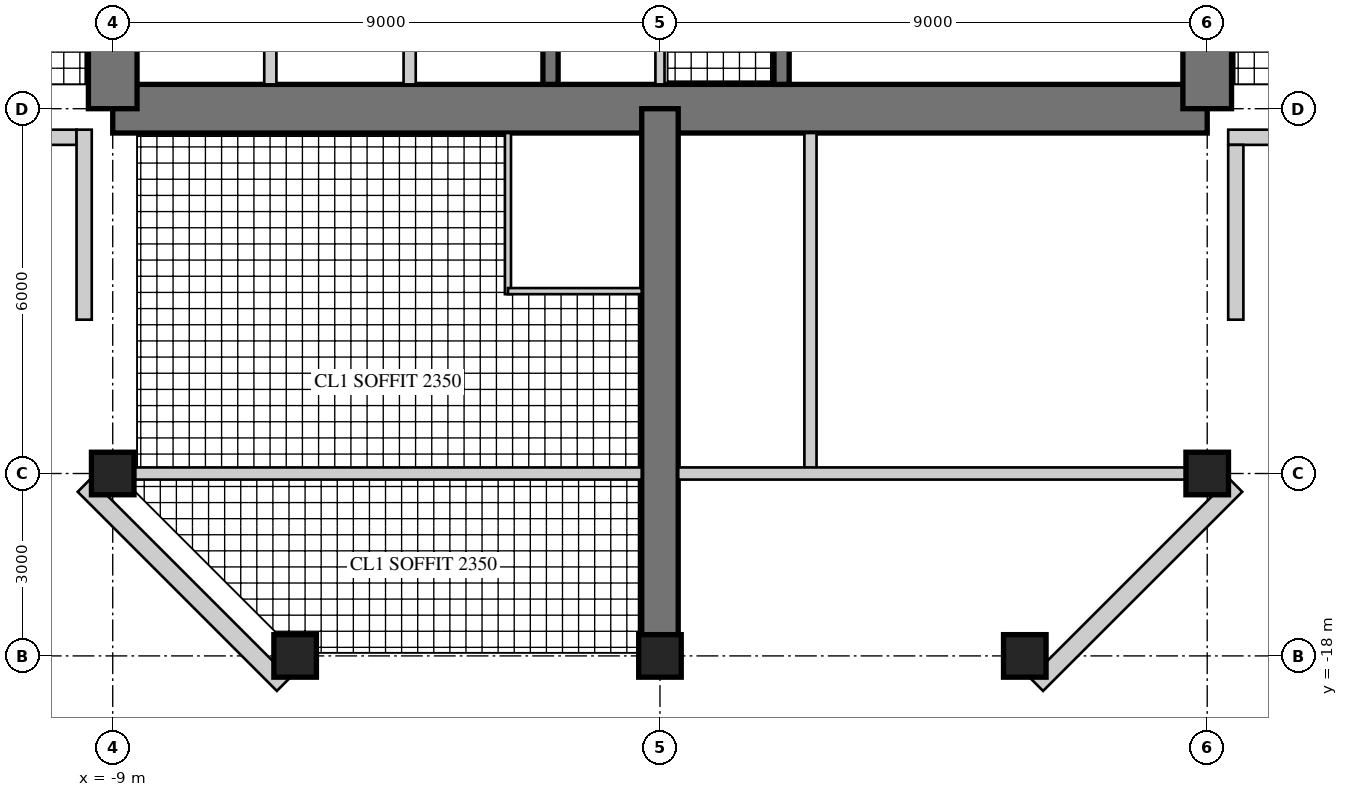
"""IFC4 building model, lengths in metres.
Left out: names, types, materials, properties, quantities, classifications, styles, units other than length and angle.
Written with IfcOpenShell. Run it as: python <this file> out.ifc"""

import sys

from ifc_helpers import new_model, si_unit, direction, frame, frame_2d, origin, origin_2d, place, context, subcontext, project, spatial, rectangle, hollow_rectangle, extrude, element, fill, save


model = new_model("IFC4")
c1 = context("Model", 3, precision=1e-05, world=origin(), true_north=direction((0.0, 1.0)))
c2 = subcontext(c1, "Body", "Model", "MODEL_VIEW")
j1 = project(units=[si_unit("LENGTHUNIT", "METRE"), si_unit("PLANEANGLEUNIT", "RADIAN")], contexts=[c1])
p1 = place(None, origin())
s1 = spatial("IfcSite", under=j1, at=p1, CompositionType="ELEMENT")
p2 = place(p1, origin())
s2 = spatial("IfcBuilding", under=s1, at=p2, CompositionType="ELEMENT")
p3 = place(p2, frame((0.0, 0.0, 267.9)))
s3 = spatial("IfcBuildingStorey", under=s2, at=p3, CompositionType="ELEMENT", Elevation=267.9)
p4 = place(p3, frame((-9.0, -9.0, 0.0), z_axis=(0.0, 0.0, 1.0), x_axis=(1.0, 0.0, 0.0)))
e1 = element("IfcWall", 1, at=p4, inside=s3, PredefinedType="SHEAR", context=c2, shape_type="SweptSolid", body=[
    extrude(rectangle(XDim=18.0, YDim=0.8, at=frame_2d((9.0, 0.0))), origin(), (0.0, 0.0, 1.0), 3.4),
])
p5 = place(p4, frame((9.8, 0.0, 0.0)))
e2 = element("IfcOpeningElement", 2, at=p5, cuts=e1, PredefinedType="OPENING", context=c2, shape_type="SweptSolid", body=[
    extrude(rectangle(XDim=1.0, YDim=2.4, at=frame_2d((0.5, 1.2))), frame((0.0, 0.41, 0.0), z_axis=(0.0, -1.0, 0.0), x_axis=(1.0, 0.0, 0.0)), (0.0, 0.0, 1.0), 0.82),
])
p6 = place(p3, frame((9.0, -9.0, 0.0), z_axis=(0.0, 0.0, 1.0), x_axis=(0.0, 1.0, 0.0)))
e3 = element("IfcWall", 3, at=p6, inside=s3, PredefinedType="SHEAR", context=c2, shape_type="SweptSolid", body=[
    extrude(rectangle(XDim=18.0, YDim=0.8, at=frame_2d((9.0, 0.0))), origin(), (0.0, 0.0, 1.0), 3.4),
])
p7 = place(p6, frame((9.8, 0.0, 0.0)))
e4 = element("IfcOpeningElement", 4, at=p7, cuts=e3, PredefinedType="OPENING", context=c2, shape_type="SweptSolid", body=[
    extrude(rectangle(XDim=1.0, YDim=2.4, at=frame_2d((0.5, 1.2))), frame((0.0, 0.41, 0.0), z_axis=(0.0, -1.0, 0.0), x_axis=(1.0, 0.0, 0.0)), (0.0, 0.0, 1.0), 0.82),
])
p8 = place(p3, frame((-9.0, 9.0, 0.0), z_axis=(0.0, 0.0, 1.0), x_axis=(0.0, -1.0, 0.0)))
e5 = element("IfcWall", 5, at=p8, inside=s3, PredefinedType="SHEAR", context=c2, shape_type="SweptSolid", body=[
    extrude(rectangle(XDim=18.0, YDim=0.8, at=frame_2d((9.0, 0.0))), origin(), (0.0, 0.0, 1.0), 3.4),
])
p9 = place(p8, frame((9.8, 0.0, 0.0)))
e6 = element("IfcOpeningElement", 6, at=p9, cuts=e5, PredefinedType="OPENING", context=c2, shape_type="SweptSolid", body=[
    extrude(rectangle(XDim=1.0, YDim=2.4, at=frame_2d((0.5, 1.2))), frame((0.0, 0.41, 0.0), z_axis=(0.0, -1.0, 0.0), x_axis=(1.0, 0.0, 0.0)), (0.0, 0.0, 1.0), 0.82),
])
p10 = place(p3, frame((-1.8, -1.875, 0.0), z_axis=(0.0, 0.0, 1.0), x_axis=(0.0, -1.0, 0.0)))
e7 = element("IfcWall", 7, at=p10, inside=s3, PredefinedType="SHEAR", context=c2, shape_type="SweptSolid", body=[
    extrude(rectangle(XDim=6.725, YDim=0.25, at=frame_2d((3.363, 0.0))), origin(), (0.0, 0.0, 1.0), 3.4),
])
p11 = place(p10, frame((1.875, 0.0, 0.0)))
e8 = element("IfcOpeningElement", 8, at=p11, cuts=e7, PredefinedType="OPENING", context=c2, shape_type="SweptSolid", body=[
    extrude(rectangle(XDim=1.6, YDim=2.4, at=frame_2d((0.8, 1.2))), frame((0.0, 0.135, 0.0), z_axis=(0.0, -1.0, 0.0), x_axis=(1.0, 0.0, 0.0)), (0.0, 0.0, 1.0), 0.27),
])
for number, where, z_axis, x_axis in (
    (9, (-4.117, -5.975, 0.0), (0.0, 0.0, 1.0), (0.0, -1.0, 0.0)),
    (10, (-6.408, -5.975, 0.0), (0.0, 0.0, 1.0), (0.0, -1.0, 0.0)),
):
    element("IfcWall", number, at=place(p3, frame(where, z_axis=z_axis, x_axis=x_axis)), inside=s3, PredefinedType="PARTITIONING", context=c2, shape_type="SweptSolid", body=[
        extrude(rectangle(XDim=2.625, YDim=0.2, at=frame_2d((1.312, 0.0))), origin(), (0.0, 0.0, 1.0), 3.4),
    ])
p12 = place(p3, frame((2.0, -1.675, 0.0), z_axis=(0.0, 0.0, 1.0), x_axis=(0.0, -1.0, 0.0)))
e11 = element("IfcWall", 11, at=p12, inside=s3, PredefinedType="SHEAR", context=c2, shape_type="SweptSolid", body=[
    extrude(rectangle(XDim=6.925, YDim=0.25, at=frame_2d((3.462, 0.0))), origin(), (0.0, 0.0, 1.0), 3.4),
])
p13 = place(p12, frame((0.725, 0.0, 0.0)))
e12 = element("IfcOpeningElement", 12, at=p13, cuts=e11, PredefinedType="OPENING", context=c2, shape_type="SweptSolid", body=[
    extrude(rectangle(XDim=1.0, YDim=2.1, at=frame_2d((0.5, 1.05))), frame((0.0, 0.135, 0.0), z_axis=(0.0, -1.0, 0.0), x_axis=(1.0, 0.0, 0.0)), (0.0, 0.0, 1.0), 0.27),
])
p14 = place(p3, frame((0.0, -9.0, 0.0), z_axis=(0.0, 0.0, 1.0), x_axis=(0.0, -1.0, 0.0)))
e13 = element("IfcWall", 13, at=p14, inside=s3, PredefinedType="SHEAR", context=c2, shape_type="SweptSolid", body=[
    extrude(rectangle(XDim=9.0, YDim=0.6, at=frame_2d((4.5, 0.0))), origin(), (0.0, 0.0, 1.0), 3.4),
])
p15 = place(p14, frame((3.8, 0.0, 0.0)))
e14 = element("IfcOpeningElement", 14, at=p15, cuts=e13, PredefinedType="OPENING", context=c2, shape_type="SweptSolid", body=[
    extrude(rectangle(XDim=1.0, YDim=2.15, at=frame_2d((0.5, 1.075))), frame((0.0, 0.31, 0.0), z_axis=(0.0, -1.0, 0.0), x_axis=(1.0, 0.0, 0.0)), (0.0, 0.0, 1.0), 0.62),
])
p16 = place(p14, frame((7.0, 0.0, 0.0)))
e15 = element("IfcOpeningElement", 15, at=p16, cuts=e13, PredefinedType="OPENING", context=c2, shape_type="SweptSolid", body=[
    extrude(rectangle(XDim=1.0, YDim=2.2, at=frame_2d((0.5, 1.1))), frame((0.0, 0.31, 0.0), z_axis=(0.0, -1.0, 0.0), x_axis=(1.0, 0.0, 0.0)), (0.0, 0.0, 1.0), 0.62),
])
for number, where, z_axis, x_axis in (
    (16, (-9.0, -15.0, 0.0), (0.0, 0.0, 1.0), (1.0, 0.0, 0.0)),
    (17, (9.0, -15.0, 0.0), (0.0, 0.0, 1.0), (1.0, 0.0, 0.0)),
    (18, (-6.0, -18.0, 0.0), (0.0, 0.0, 1.0), (1.0, 0.0, 0.0)),
    (19, (0.0, -18.0, 0.0), (0.0, 0.0, 1.0), (1.0, 0.0, 0.0)),
    (20, (6.0, -18.0, 0.0), (0.0, 0.0, 1.0), (1.0, 0.0, 0.0)),
):
    element("IfcColumn", number, at=place(p3, frame(where, z_axis=z_axis, x_axis=x_axis)), inside=s3, PredefinedType="COLUMN", context=c2, shape_type="SweptSolid", body=[
        extrude(rectangle(XDim=0.7, YDim=0.7, at=origin_2d()), origin(), (0.0, 0.0, 1.0), 3.4),
    ])
p17 = place(p3, frame((9.345, -9.47, 0.0), z_axis=(0.0, 0.0, 1.0), x_axis=(1.0, 0.0, 0.0)))
e21 = element("IfcWall", 21, at=p17, inside=s3, PredefinedType="SOLIDWALL", context=c2, shape_type="SweptSolid", body=[
    extrude(rectangle(XDim=3.125, YDim=0.25, at=frame_2d((1.562, 0.0))), origin(), (0.0, 0.0, 1.0), 3.22),
])
p18 = place(p17, frame((0.6, 0.0, 0.0)))
e22 = element("IfcOpeningElement", 22, at=p18, cuts=e21, PredefinedType="OPENING", context=c2, shape_type="SweptSolid", body=[
    extrude(rectangle(XDim=1.0, YDim=2.2, at=frame_2d((0.5, 1.1))), frame((0.0, 0.135, 0.0), z_axis=(0.0, -1.0, 0.0), x_axis=(1.0, 0.0, 0.0)), (0.0, 0.0, 1.0), 0.27),
])
p19 = place(p3, frame((-12.47, -9.47, 0.0), z_axis=(0.0, 0.0, 1.0), x_axis=(1.0, 0.0, 0.0)))
e23 = element("IfcWall", 23, at=p19, inside=s3, PredefinedType="SOLIDWALL", context=c2, shape_type="SweptSolid", body=[
    extrude(rectangle(XDim=2.875, YDim=0.25, at=frame_2d((1.438, 0.0))), origin(), (0.0, 0.0, 1.0), 3.22),
])
p20 = place(p19, frame((0.6, 0.0, 0.0)))
e24 = element("IfcOpeningElement", 24, at=p20, cuts=e23, PredefinedType="OPENING", context=c2, shape_type="SweptSolid", body=[
    extrude(rectangle(XDim=1.0, YDim=2.2, at=frame_2d((0.5, 1.1))), frame((0.0, 0.135, 0.0), z_axis=(0.0, -1.0, 0.0), x_axis=(1.0, 0.0, 0.0)), (0.0, 0.0, 1.0), 0.27),
])
p21 = place(p3, frame((-9.47, -9.345, 0.0), z_axis=(0.0, 0.0, 1.0), x_axis=(0.0, -1.0, 0.0)))
e25 = element("IfcWall", 25, at=p21, inside=s3, PredefinedType="SOLIDWALL", context=c2, shape_type="SweptSolid", body=[
    extrude(rectangle(XDim=3.125, YDim=0.25, at=frame_2d((1.562, 0.0))), origin(), (0.0, 0.0, 1.0), 3.22),
])
p22 = place(p21, frame((0.6, 0.0, 0.0)))
e26 = element("IfcOpeningElement", 26, at=p22, cuts=e25, PredefinedType="OPENING", context=c2, shape_type="SweptSolid", body=[
    extrude(rectangle(XDim=1.0, YDim=2.2, at=frame_2d((0.5, 1.1))), frame((0.0, 0.135, 0.0), z_axis=(0.0, -1.0, 0.0), x_axis=(1.0, 0.0, 0.0)), (0.0, 0.0, 1.0), 0.27),
])
p23 = place(p3, frame((-9.47, -15.195, 0.0), z_axis=(0.0, 0.0, 1.0), x_axis=(0.707106781187, -0.707106781187, 0.0)))
e27 = element("IfcWall", 27, at=p23, inside=s3, PredefinedType="SOLIDWALL", context=c2, shape_type="SweptSolid", body=[
    extrude(rectangle(XDim=4.632, YDim=0.3, at=frame_2d((2.316, 0.0))), origin(), (0.0, 0.0, 1.0), 3.22),
])
p24 = place(p23, frame((1.866, 0.0, 0.3)))
e28 = element("IfcOpeningElement", 28, at=p24, cuts=e27, PredefinedType="OPENING", context=c2, shape_type="SweptSolid", body=[
    extrude(rectangle(XDim=0.9, YDim=2.4, at=frame_2d((0.45, 1.2))), frame((0.0, 0.16, 0.0), z_axis=(0.0, -1.0, 0.0), x_axis=(1.0, 0.0, 0.0)), (0.0, 0.0, 1.0), 0.32),
])
p25 = place(p3, frame((6.195, -18.47, 0.0), z_axis=(0.0, 0.0, 1.0), x_axis=(0.707106781187, 0.707106781187, 0.0)))
e29 = element("IfcWall", 29, at=p25, inside=s3, PredefinedType="SOLIDWALL", context=c2, shape_type="SweptSolid", body=[
    extrude(rectangle(XDim=4.632, YDim=0.3, at=frame_2d((2.316, 0.0))), origin(), (0.0, 0.0, 1.0), 3.22),
])
p26 = place(p25, frame((1.866, 0.0, 0.3)))
e30 = element("IfcOpeningElement", 30, at=p26, cuts=e29, PredefinedType="OPENING", context=c2, shape_type="SweptSolid", body=[
    extrude(rectangle(XDim=0.9, YDim=2.4, at=frame_2d((0.45, 1.2))), frame((0.0, 0.16, 0.0), z_axis=(0.0, -1.0, 0.0), x_axis=(1.0, 0.0, 0.0)), (0.0, 0.0, 1.0), 0.32),
])
p27 = place(p3, frame((9.47, -12.47, 0.0), z_axis=(0.0, 0.0, 1.0), x_axis=(0.0, 1.0, 0.0)))
e31 = element("IfcWall", 31, at=p27, inside=s3, PredefinedType="SOLIDWALL", context=c2, shape_type="SweptSolid", body=[
    extrude(rectangle(XDim=2.875, YDim=0.25, at=frame_2d((1.438, 0.0))), origin(), (0.0, 0.0, 1.0), 3.22),
])
p28 = place(p27, frame((0.6, 0.0, 0.0)))
e32 = element("IfcOpeningElement", 32, at=p28, cuts=e31, PredefinedType="OPENING", context=c2, shape_type="SweptSolid", body=[
    extrude(rectangle(XDim=1.0, YDim=2.2, at=frame_2d((0.5, 1.1))), frame((0.0, 0.135, 0.0), z_axis=(0.0, -1.0, 0.0), x_axis=(1.0, 0.0, 0.0)), (0.0, 0.0, 1.0), 0.27),
])
p29 = place(p3, frame((0.0, -5.675, 0.0), z_axis=(0.0, 0.0, 1.0), x_axis=(0.0, -1.0, 0.0)))
e33 = element("IfcWall", 33, at=p29, inside=s3, PredefinedType="PARTITIONING", context=c2, shape_type="SweptSolid", body=[
    extrude(rectangle(XDim=2.925, YDim=0.15, at=frame_2d((1.462, 0.0))), origin(), (0.0, 0.0, 1.0), 3.22),
])
p30 = place(p29, frame((0.4, 0.0, 0.0)))
e34 = element("IfcOpeningElement", 34, at=p30, cuts=e33, PredefinedType="OPENING", context=c2, shape_type="SweptSolid", body=[
    extrude(rectangle(XDim=1.0, YDim=2.1, at=frame_2d((0.5, 1.05))), frame((0.0, 0.085, 0.0), z_axis=(0.0, -1.0, 0.0), x_axis=(1.0, 0.0, 0.0)), (0.0, 0.0, 1.0), 0.17),
])
p31 = place(p3, frame((-2.5, -9.4, 0.0), z_axis=(0.0, 0.0, 1.0), x_axis=(0.0, -1.0, 0.0)))
e35 = element("IfcWall", 35, at=p31, inside=s3, PredefinedType="PARTITIONING", context=c2, shape_type="SweptSolid", body=[
    extrude(rectangle(XDim=2.65, YDim=0.1, at=frame_2d((1.325, 0.0))), origin(), (0.0, 0.0, 1.0), 3.22),
])
p32 = place(p3, frame((-2.5, -12.0, 0.0), z_axis=(0.0, 0.0, 1.0), x_axis=(1.0, 0.0, 0.0)))
e36 = element("IfcWall", 36, at=p32, inside=s3, PredefinedType="PARTITIONING", context=c2, shape_type="SweptSolid", body=[
    extrude(rectangle(XDim=2.2, YDim=0.1, at=frame_2d((1.1, 0.0))), origin(), (0.0, 0.0, 1.0), 3.22),
])
p33 = place(p32, frame((0.55, 0.0, 0.0)))
e37 = element("IfcOpeningElement", 37, at=p33, cuts=e36, PredefinedType="OPENING", context=c2, shape_type="SweptSolid", body=[
    extrude(rectangle(XDim=0.9, YDim=2.1, at=frame_2d((0.45, 1.05))), frame((0.0, 0.06, 0.0), z_axis=(0.0, -1.0, 0.0), x_axis=(1.0, 0.0, 0.0)), (0.0, 0.0, 1.0), 0.12),
])
p34 = place(p3, frame((2.475, -9.4, 0.0), z_axis=(0.0, 0.0, 1.0), x_axis=(0.0, -1.0, 0.0)))
e38 = element("IfcWall", 38, at=p34, inside=s3, PredefinedType="SOLIDWALL", context=c2, shape_type="SweptSolid", body=[
    extrude(rectangle(XDim=5.6, YDim=0.2, at=frame_2d((2.8, 0.0))), origin(), (0.0, 0.0, 1.0), 3.22),
])
p35 = place(p34, frame((1.2, 0.0, 0.0)))
e39 = element("IfcOpeningElement", 39, at=p35, cuts=e38, PredefinedType="OPENING", context=c2, shape_type="SweptSolid", body=[
    extrude(rectangle(XDim=1.0, YDim=2.2, at=frame_2d((0.5, 1.1))), frame((0.0, 0.11, 0.0), z_axis=(0.0, -1.0, 0.0), x_axis=(1.0, 0.0, 0.0)), (0.0, 0.0, 1.0), 0.22),
])
p36 = place(p3, frame((-8.65, -15.0, 0.0), z_axis=(0.0, 0.0, 1.0), x_axis=(1.0, 0.0, 0.0)))
e40 = element("IfcWall", 40, at=p36, inside=s3, PredefinedType="SOLIDWALL", context=c2, shape_type="SweptSolid", body=[
    extrude(rectangle(XDim=8.35, YDim=0.2, at=frame_2d((4.175, 0.0))), origin(), (0.0, 0.0, 1.0), 2.52),
])
p37 = place(p3, frame((0.3, -15.0, 0.0), z_axis=(0.0, 0.0, 1.0), x_axis=(1.0, 0.0, 0.0)))
e41 = element("IfcWall", 41, at=p37, inside=s3, PredefinedType="SOLIDWALL", context=c2, shape_type="SweptSolid", body=[
    extrude(rectangle(XDim=8.35, YDim=0.2, at=frame_2d((4.175, 0.0))), origin(), (0.0, 0.0, 1.0), 2.52),
])
p38 = place(p37, frame((0.4, 0.0, 0.0)))
e42 = element("IfcOpeningElement", 42, at=p38, cuts=e41, PredefinedType="OPENING", context=c2, shape_type="SweptSolid", body=[
    extrude(rectangle(XDim=1.0, YDim=2.2, at=frame_2d((0.5, 1.1))), frame((0.0, 0.11, 0.0), z_axis=(0.0, -1.0, 0.0), x_axis=(1.0, 0.0, 0.0)), (0.0, 0.0, 1.0), 0.22),
])
p39 = place(p18, origin())
e43 = element("IfcDoor", 43, at=p39, inside=s3, OperationType="SINGLE_SWING_LEFT", PredefinedType="DOOR", context=c2, shape_type="SweptSolid", body=[
    extrude(hollow_rectangle(XDim=1.0, YDim=2.2, WallThickness=0.06, at=frame_2d((0.5, 1.1))), frame((0.0, 0.025, 0.0), z_axis=(0.0, -1.0, 0.0), x_axis=(1.0, 0.0, 0.0)), (0.0, 0.0, 1.0), 0.05),
    extrude(rectangle(XDim=0.879, YDim=2.079, at=frame_2d((0.5, 1.1))), frame((0.0, 0.025, 0.0), z_axis=(0.0, -1.0, 0.0), x_axis=(1.0, 0.0, 0.0)), (0.0, 0.0, 1.0), 0.05),
])
fill(e22, e43)
p40 = place(p22, origin())
e44 = element("IfcDoor", 44, at=p40, inside=s3, OperationType="SINGLE_SWING_LEFT", PredefinedType="DOOR", context=c2, shape_type="SweptSolid", body=[
    extrude(hollow_rectangle(XDim=1.0, YDim=2.2, WallThickness=0.06, at=frame_2d((0.5, 1.1))), frame((0.0, 0.025, 0.0), z_axis=(0.0, -1.0, 0.0), x_axis=(1.0, 0.0, 0.0)), (0.0, 0.0, 1.0), 0.05),
    extrude(rectangle(XDim=0.879, YDim=2.079, at=frame_2d((0.5, 1.1))), frame((0.0, 0.025, 0.0), z_axis=(0.0, -1.0, 0.0), x_axis=(1.0, 0.0, 0.0)), (0.0, 0.0, 1.0), 0.05),
])
fill(e26, e44)
p41 = place(p24, origin())
e45 = element("IfcWindow", 45, at=p41, inside=s3, PartitioningType="SINGLE_PANEL", PredefinedType="WINDOW", context=c2, shape_type="SweptSolid", body=[
    extrude(hollow_rectangle(XDim=0.9, YDim=2.4, WallThickness=0.06, at=frame_2d((0.45, 1.2))), frame((0.0, 0.03, 0.0), z_axis=(0.0, -1.0, 0.0), x_axis=(1.0, 0.0, 0.0)), (0.0, 0.0, 1.0), 0.06),
    extrude(rectangle(XDim=0.779, YDim=2.279, at=frame_2d((0.45, 1.2))), frame((0.0, 0.03, 0.0), z_axis=(0.0, -1.0, 0.0), x_axis=(1.0, 0.0, 0.0)), (0.0, 0.0, 1.0), 0.06),
])
fill(e28, e45)
p42 = place(p26, origin())
e46 = element("IfcWindow", 46, at=p42, inside=s3, PartitioningType="SINGLE_PANEL", PredefinedType="WINDOW", context=c2, shape_type="SweptSolid", body=[
    extrude(hollow_rectangle(XDim=0.9, YDim=2.4, WallThickness=0.06, at=frame_2d((0.45, 1.2))), frame((0.0, 0.03, 0.0), z_axis=(0.0, -1.0, 0.0), x_axis=(1.0, 0.0, 0.0)), (0.0, 0.0, 1.0), 0.06),
    extrude(rectangle(XDim=0.779, YDim=2.279, at=frame_2d((0.45, 1.2))), frame((0.0, 0.03, 0.0), z_axis=(0.0, -1.0, 0.0), x_axis=(1.0, 0.0, 0.0)), (0.0, 0.0, 1.0), 0.06),
])
fill(e30, e46)
p43 = place(p28, origin())
e47 = element("IfcDoor", 47, at=p43, inside=s3, OperationType="SINGLE_SWING_RIGHT", PredefinedType="DOOR", context=c2, shape_type="SweptSolid", body=[
    extrude(hollow_rectangle(XDim=1.0, YDim=2.2, WallThickness=0.06, at=frame_2d((0.5, 1.1))), frame((0.0, 0.025, 0.0), z_axis=(0.0, -1.0, 0.0), x_axis=(1.0, 0.0, 0.0)), (0.0, 0.0, 1.0), 0.05),
    extrude(rectangle(XDim=0.879, YDim=2.079, at=frame_2d((0.5, 1.1))), frame((0.0, 0.025, 0.0), z_axis=(0.0, -1.0, 0.0), x_axis=(1.0, 0.0, 0.0)), (0.0, 0.0, 1.0), 0.05),
])
fill(e32, e47)
p44 = place(p33, origin())
e48 = element("IfcDoor", 48, at=p44, inside=s3, OperationType="SINGLE_SWING_LEFT", PredefinedType="DOOR", context=c2, shape_type="SweptSolid", body=[
    extrude(rectangle(XDim=0.9, YDim=2.1, at=frame_2d((0.45, 1.05))), frame((0.0, 0.025, 0.0), z_axis=(0.0, -1.0, 0.0), x_axis=(1.0, 0.0, 0.0)), (0.0, 0.0, 1.0), 0.05),
])
fill(e37, e48)
p45 = place(p35, origin())
e49 = element("IfcDoor", 49, at=p45, inside=s3, OperationType="SINGLE_SWING_LEFT", PredefinedType="DOOR", context=c2, shape_type="SweptSolid", body=[
    extrude(rectangle(XDim=1.0, YDim=2.2, at=frame_2d((0.5, 1.1))), frame((0.0, 0.025, 0.0), z_axis=(0.0, -1.0, 0.0), x_axis=(1.0, 0.0, 0.0)), (0.0, 0.0, 1.0), 0.05),
])
fill(e39, e49)
p46 = place(p38, frame((1.0, 0.0, 0.0), z_axis=(0.0, 0.0, 1.0), x_axis=(-1.0, 0.0, 0.0)))
e50 = element("IfcDoor", 50, at=p46, inside=s3, OperationType="SINGLE_SWING_LEFT", PredefinedType="DOOR", context=c2, shape_type="SweptSolid", body=[
    extrude(rectangle(XDim=1.0, YDim=2.2, at=frame_2d((0.5, 1.1))), frame((0.0, 0.025, 0.0), z_axis=(0.0, -1.0, 0.0), x_axis=(1.0, 0.0, 0.0)), (0.0, 0.0, 1.0), 0.05),
])
fill(e42, e50)
p47 = place(p15, frame((1.0, 0.0, 0.0), z_axis=(0.0, 0.0, 1.0), x_axis=(-1.0, 0.0, 0.0)))
e51 = element("IfcDoor", 51, at=p47, inside=s3, OperationType="SINGLE_SWING_RIGHT", PredefinedType="DOOR", context=c2, shape_type="SweptSolid", body=[
    extrude(rectangle(XDim=1.0, YDim=2.15, at=frame_2d((0.5, 1.075))), frame((0.0, 0.025, 0.0), z_axis=(0.0, -1.0, 0.0), x_axis=(1.0, 0.0, 0.0)), (0.0, 0.0, 1.0), 0.05),
])
fill(e14, e51)
p48 = place(p16, origin())
e52 = element("IfcDoor", 52, at=p48, inside=s3, OperationType="SINGLE_SWING_LEFT", PredefinedType="DOOR", context=c2, shape_type="SweptSolid", body=[
    extrude(rectangle(XDim=1.0, YDim=2.2, at=frame_2d((0.5, 1.1))), frame((0.0, 0.025, 0.0), z_axis=(0.0, -1.0, 0.0), x_axis=(1.0, 0.0, 0.0)), (0.0, 0.0, 1.0), 0.05),
])
fill(e15, e52)
p49 = place(p5, origin())
e53 = element("IfcDoor", 53, at=p49, inside=s3, OperationType="SINGLE_SWING_RIGHT", PredefinedType="DOOR", context=c2, shape_type="SweptSolid", body=[
    extrude(rectangle(XDim=1.0, YDim=2.4, at=frame_2d((0.5, 1.2))), frame((0.0, 0.055, 0.0), z_axis=(0.0, -1.0, 0.0), x_axis=(1.0, 0.0, 0.0)), (0.0, 0.0, 1.0), 0.05),
])
fill(e2, e53)
save(model, sys.argv[1])
